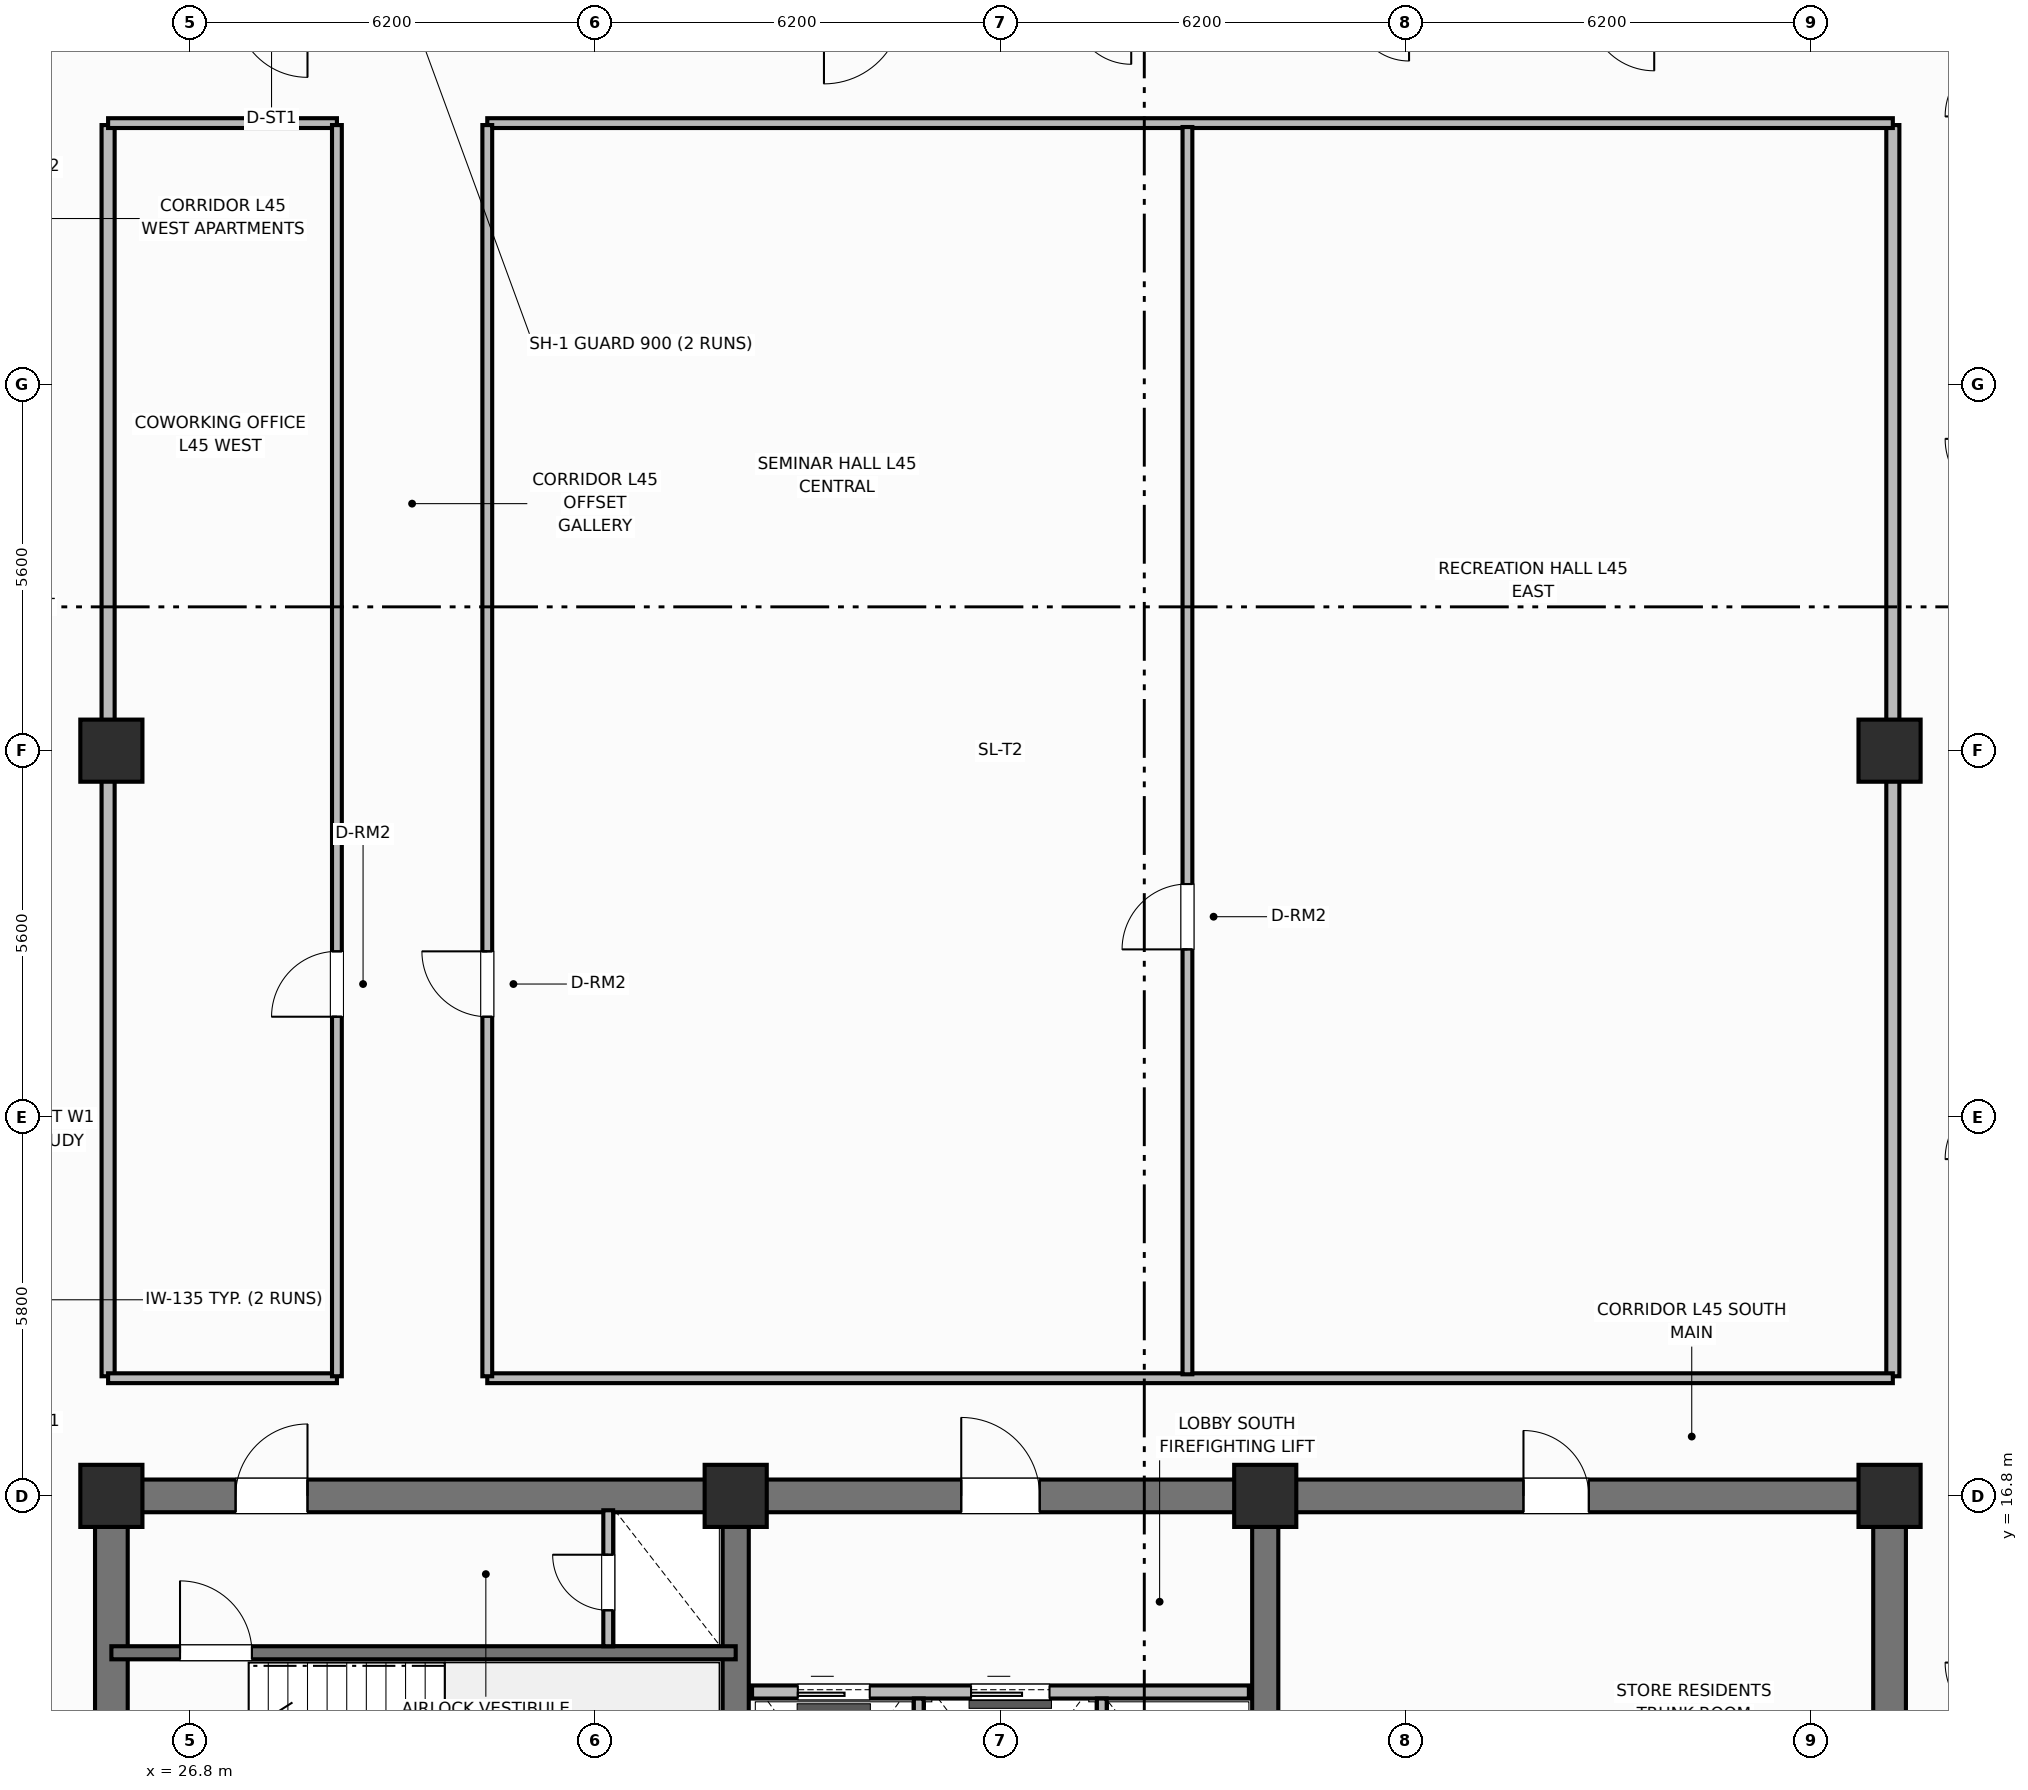
"""IFC4 building model, lengths in metres.
Left out: names, types, materials, properties, quantities, classifications, styles, units other than length and angle.
Written with IfcOpenShell. Run it as: python <this file> out.ifc"""

import sys

from ifc_helpers import new_model, si_unit, direction, frame, frame_2d, origin, origin_2d, place, context, subcontext, project, spatial, rectangle, extrude, element, fill, save


model = new_model("IFC4")
c1 = context("Model", 3, precision=1e-05, world=origin(), true_north=direction((0.0, 1.0)))
c2 = subcontext(c1, "Body", "Model", "MODEL_VIEW")
j1 = project(units=[si_unit("LENGTHUNIT", "METRE"), si_unit("PLANEANGLEUNIT", "RADIAN")], contexts=[c1])
p1 = place(None, origin())
s1 = spatial("IfcSite", under=j1, at=p1, CompositionType="ELEMENT")
p2 = place(p1, origin())
s2 = spatial("IfcBuilding", under=s1, at=p2, CompositionType="ELEMENT")
p3 = place(p2, frame((0.0, 0.0, 181.1)))
s3 = spatial("IfcBuildingStorey", under=s2, at=p3, CompositionType="ELEMENT", Elevation=181.1)
for number, where, z_axis, x_axis in (
    (1, (25.6, 10.85, 0.0), (0.0, 0.0, 1.0), (0.0, 1.0, 0.0)),
    (2, (52.8, 10.85, 0.0), (0.0, 0.0, 1.0), (0.0, 1.0, 0.0)),
):
    element("IfcWall", number, at=place(p3, frame(where, z_axis=z_axis, x_axis=x_axis)), inside=s3, PredefinedType="SHEAR", context=c2, shape_type="SweptSolid", body=[
        extrude(rectangle(XDim=5.7, YDim=0.5, at=frame_2d((2.85, 0.0))), origin(), (0.0, 0.0, 1.0), 3.7),
    ])
p4 = place(p3, frame((25.6, 16.8, 0.0), z_axis=(0.0, 0.0, 1.0), x_axis=(1.0, 0.0, 0.0)))
e3 = element("IfcWall", 3, at=p4, inside=s3, PredefinedType="SHEAR", context=c2, shape_type="SweptSolid", body=[
    extrude(rectangle(XDim=27.2, YDim=0.5, at=frame_2d((13.6, 0.0))), origin(), (0.0, 0.0, 1.0), 3.7),
])
p5 = place(p4, frame((1.9, 0.0, 0.0)))
e4 = element("IfcOpeningElement", 4, at=p5, cuts=e3, PredefinedType="OPENING", context=c2, shape_type="SweptSolid", body=[
    extrude(rectangle(XDim=1.1, YDim=2.15, at=frame_2d((0.55, 1.075))), frame((0.0, 0.26, 0.0), z_axis=(0.0, -1.0, 0.0), x_axis=(1.0, 0.0, 0.0)), (0.0, 0.0, 1.0), 0.52),
])
p6 = place(p4, frame((13.0, 0.0, 0.0)))
e5 = element("IfcOpeningElement", 5, at=p6, cuts=e3, PredefinedType="OPENING", context=c2, shape_type="SweptSolid", body=[
    extrude(rectangle(XDim=1.2, YDim=2.15, at=frame_2d((0.6, 1.075))), frame((0.0, 0.26, 0.0), z_axis=(0.0, -1.0, 0.0), x_axis=(1.0, 0.0, 0.0)), (0.0, 0.0, 1.0), 0.52),
])
p7 = place(p4, frame((21.6, 0.0, 0.0)))
e6 = element("IfcOpeningElement", 6, at=p7, cuts=e3, PredefinedType="OPENING", context=c2, shape_type="SweptSolid", body=[
    extrude(rectangle(XDim=1.0, YDim=2.15, at=frame_2d((0.5, 1.075))), frame((0.0, 0.26, 0.0), z_axis=(0.0, -1.0, 0.0), x_axis=(1.0, 0.0, 0.0)), (0.0, 0.0, 1.0), 0.52),
])
for number, where, z_axis, x_axis in (
    (7, (35.15, 10.85, 0.0), (0.0, 0.0, 1.0), (0.0, 1.0, 0.0)),
    (8, (43.25, 10.85, 0.0), (0.0, 0.0, 1.0), (0.0, 1.0, 0.0)),
):
    element("IfcWall", number, at=place(p3, frame(where, z_axis=z_axis, x_axis=x_axis)), inside=s3, PredefinedType="SHEAR", context=c2, shape_type="SweptSolid", body=[
        extrude(rectangle(XDim=5.7, YDim=0.4, at=frame_2d((2.85, 0.0))), origin(), (0.0, 0.0, 1.0), 3.7),
    ])
for number, where, z_axis, x_axis in (
    (9, (25.6, 16.8, 0.0), (0.0, 0.0, 1.0), (1.0, 0.0, 0.0)),
    (10, (35.15, 16.8, 0.0), (0.0, 0.0, 1.0), (1.0, 0.0, 0.0)),
    (11, (43.25, 16.8, 0.0), (0.0, 0.0, 1.0), (1.0, 0.0, 0.0)),
    (12, (52.8, 16.8, 0.0), (0.0, 0.0, 1.0), (1.0, 0.0, 0.0)),
    (13, (25.6, 28.2, 0.0), (0.0, 0.0, 1.0), (1.0, 0.0, 0.0)),
    (14, (52.8, 28.2, 0.0), (0.0, 0.0, 1.0), (1.0, 0.0, 0.0)),
):
    element("IfcColumn", number, at=place(p3, frame(where, z_axis=z_axis, x_axis=x_axis)), inside=s3, PredefinedType="COLUMN", context=c2, shape_type="SweptSolid", body=[
        extrude(rectangle(XDim=0.95, YDim=0.95, at=origin_2d()), origin(), (0.0, 0.0, 1.0), 3.7),
    ])
p8 = place(p3, frame((25.6, 14.4, 0.0), z_axis=(0.0, 0.0, 1.0), x_axis=(1.0, 0.0, 0.0)))
e15 = element("IfcWall", 15, at=p8, inside=s3, PredefinedType="SHEAR", context=c2, shape_type="SweptSolid", body=[
    extrude(rectangle(XDim=9.55, YDim=0.2, at=frame_2d((4.775, 0.0))), origin(), (0.0, 0.0, 1.0), 3.7),
])
p9 = place(p8, frame((1.05, 0.0, 0.0)))
e16 = element("IfcOpeningElement", 16, at=p9, cuts=e15, PredefinedType="OPENING", context=c2, shape_type="SweptSolid", body=[
    extrude(rectangle(XDim=1.1, YDim=2.15, at=frame_2d((0.55, 1.075))), frame((0.0, 0.11, 0.0), z_axis=(0.0, -1.0, 0.0), x_axis=(1.0, 0.0, 0.0)), (0.0, 0.0, 1.0), 0.22),
])
p10 = place(p3, frame((33.2, 14.5, 0.0), z_axis=(0.0, 0.0, 1.0), x_axis=(0.0, 1.0, 0.0)))
e17 = element("IfcWall", 17, at=p10, inside=s3, PredefinedType="PARTITIONING", context=c2, shape_type="SweptSolid", body=[
    extrude(rectangle(XDim=2.08, YDim=0.15, at=frame_2d((1.04, 0.0))), origin(), (0.0, 0.0, 1.0), 2.55),
])
p11 = place(p10, frame((0.55, 0.0, 0.0)))
e18 = element("IfcOpeningElement", 18, at=p11, cuts=e17, PredefinedType="OPENING", context=c2, shape_type="SweptSolid", body=[
    extrude(rectangle(XDim=0.85, YDim=2.05, at=frame_2d((0.425, 1.025))), frame((0.0, 0.085, 0.0), z_axis=(0.0, -1.0, 0.0), x_axis=(1.0, 0.0, 0.0)), (0.0, 0.0, 1.0), 0.17),
])
p12 = place(p3, frame((35.4, 13.8, 0.0), z_axis=(0.0, 0.0, 1.0), x_axis=(1.0, 0.0, 0.0)))
e19 = element("IfcWall", 19, at=p12, inside=s3, PredefinedType="PARTITIONING", context=c2, shape_type="SweptSolid", body=[
    extrude(rectangle(XDim=7.6, YDim=0.2, at=frame_2d((3.8, 0.0))), origin(), (0.0, 0.0, 1.0), 2.32),
])
p13 = place(p12, frame((0.7, 0.0, 0.0)))
e20 = element("IfcOpeningElement", 20, at=p13, cuts=e19, PredefinedType="OPENING", context=c2, shape_type="SweptSolid", body=[
    extrude(rectangle(XDim=1.1, YDim=2.15, at=frame_2d((0.55, 1.075))), frame((0.0, 0.11, 0.0), z_axis=(0.0, -1.0, 0.0), x_axis=(1.0, 0.0, 0.0)), (0.0, 0.0, 1.0), 0.22),
])
p14 = place(p12, frame((3.35, 0.0, 0.0)))
e21 = element("IfcOpeningElement", 21, at=p14, cuts=e19, PredefinedType="OPENING", context=c2, shape_type="SweptSolid", body=[
    extrude(rectangle(XDim=1.2, YDim=2.15, at=frame_2d((0.6, 1.075))), frame((0.0, 0.11, 0.0), z_axis=(0.0, -1.0, 0.0), x_axis=(1.0, 0.0, 0.0)), (0.0, 0.0, 1.0), 0.22),
])
for number, where, z_axis, x_axis in (
    (22, (37.95, 10.95, 0.0), (0.0, 0.0, 1.0), (0.0, 1.0, 0.0)),
    (23, (40.75, 10.95, 0.0), (0.0, 0.0, 1.0), (0.0, 1.0, 0.0)),
):
    element("IfcWall", number, at=place(p3, frame(where, z_axis=z_axis, x_axis=x_axis)), inside=s3, PredefinedType="PARTITIONING", context=c2, shape_type="SweptSolid", body=[
        extrude(rectangle(XDim=2.75, YDim=0.15, at=frame_2d((1.375, 0.0))), origin(), (0.0, 0.0, 1.0), 2.55),
    ])
for number, where, z_axis, x_axis in (
    (24, (25.55, 18.63, 0.0), (0.0, 0.0, 1.0), (0.0, 1.0, 0.0)),
    (25, (52.85, 18.63, 0.0), (0.0, 0.0, 1.0), (0.0, 1.0, 0.0)),
):
    element("IfcWall", number, at=place(p3, frame(where, z_axis=z_axis, x_axis=x_axis)), inside=s3, PredefinedType="PARTITIONING", context=c2, shape_type="SweptSolid", body=[
        extrude(rectangle(XDim=19.14, YDim=0.2, at=frame_2d((9.57, 0.0))), origin(), (0.0, 0.0, 1.0), 2.55),
    ])
p15 = place(p3, frame((25.55, 18.6, 0.0), z_axis=(0.0, 0.0, 1.0), x_axis=(1.0, 0.0, 0.0)))
e26 = element("IfcWall", 26, at=p15, inside=s3, PredefinedType="PARTITIONING", context=c2, shape_type="SweptSolid", body=[
    extrude(rectangle(XDim=3.5, YDim=0.15, at=frame_2d((1.75, 0.0))), origin(), (0.0, 0.0, 1.0), 2.55),
])
p16 = place(p3, frame((31.35, 18.6, 0.0), z_axis=(0.0, 0.0, 1.0), x_axis=(1.0, 0.0, 0.0)))
e27 = element("IfcWall", 27, at=p16, inside=s3, PredefinedType="PARTITIONING", context=c2, shape_type="SweptSolid", body=[
    extrude(rectangle(XDim=21.5, YDim=0.15, at=frame_2d((10.75, 0.0))), origin(), (0.0, 0.0, 1.0), 2.55),
])
p17 = place(p3, frame((25.55, 37.8, 0.0), z_axis=(0.0, 0.0, 1.0), x_axis=(1.0, 0.0, 0.0)))
e28 = element("IfcWall", 28, at=p17, inside=s3, PredefinedType="PARTITIONING", context=c2, shape_type="SweptSolid", body=[
    extrude(rectangle(XDim=3.5, YDim=0.15, at=frame_2d((1.75, 0.0))), origin(), (0.0, 0.0, 1.0), 2.55),
])
p18 = place(p3, frame((31.35, 37.8, 0.0), z_axis=(0.0, 0.0, 1.0), x_axis=(1.0, 0.0, 0.0)))
e29 = element("IfcWall", 29, at=p18, inside=s3, PredefinedType="PARTITIONING", context=c2, shape_type="SweptSolid", body=[
    extrude(rectangle(XDim=21.5, YDim=0.15, at=frame_2d((10.75, 0.0))), origin(), (0.0, 0.0, 1.0), 2.55),
])
p19 = place(p3, frame((42.06, 18.66, 0.0), z_axis=(0.0, 0.0, 1.0), x_axis=(0.0, 1.0, 0.0)))
e30 = element("IfcWall", 30, at=p19, inside=s3, PredefinedType="PARTITIONING", context=c2, shape_type="SweptSolid", body=[
    extrude(rectangle(XDim=19.08, YDim=0.15, at=frame_2d((9.54, 0.0))), origin(), (0.0, 0.0, 1.0), 2.55),
])
p20 = place(p19, frame((6.5, 0.0, 0.0)))
e31 = element("IfcOpeningElement", 31, at=p20, cuts=e30, PredefinedType="OPENING", context=c2, shape_type="SweptSolid", body=[
    extrude(rectangle(XDim=1.0, YDim=2.15, at=frame_2d((0.5, 1.075))), frame((0.0, 0.085, 0.0), z_axis=(0.0, -1.0, 0.0), x_axis=(1.0, 0.0, 0.0)), (0.0, 0.0, 1.0), 0.17),
])
p21 = place(p3, frame((29.05, 18.63, 0.0), z_axis=(0.0, 0.0, 1.0), x_axis=(0.0, 1.0, 0.0)))
e32 = element("IfcWall", 32, at=p21, inside=s3, PredefinedType="PARTITIONING", context=c2, shape_type="SweptSolid", body=[
    extrude(rectangle(XDim=19.14, YDim=0.15, at=frame_2d((9.57, 0.0))), origin(), (0.0, 0.0, 1.0), 2.55),
])
p22 = place(p21, frame((5.5, 0.0, 0.0)))
e33 = element("IfcOpeningElement", 33, at=p22, cuts=e32, PredefinedType="OPENING", context=c2, shape_type="SweptSolid", body=[
    extrude(rectangle(XDim=1.0, YDim=2.15, at=frame_2d((0.5, 1.075))), frame((0.0, 0.085, 0.0), z_axis=(0.0, -1.0, 0.0), x_axis=(1.0, 0.0, 0.0)), (0.0, 0.0, 1.0), 0.17),
])
p23 = place(p3, frame((31.35, 18.63, 0.0), z_axis=(0.0, 0.0, 1.0), x_axis=(0.0, 1.0, 0.0)))
e34 = element("IfcWall", 34, at=p23, inside=s3, PredefinedType="PARTITIONING", context=c2, shape_type="SweptSolid", body=[
    extrude(rectangle(XDim=19.14, YDim=0.15, at=frame_2d((9.57, 0.0))), origin(), (0.0, 0.0, 1.0), 2.55),
])
p24 = place(p23, frame((5.5, 0.0, 0.0)))
e35 = element("IfcOpeningElement", 35, at=p24, cuts=e34, PredefinedType="OPENING", context=c2, shape_type="SweptSolid", body=[
    extrude(rectangle(XDim=1.0, YDim=2.15, at=frame_2d((0.5, 1.075))), frame((0.0, 0.085, 0.0), z_axis=(0.0, -1.0, 0.0), x_axis=(1.0, 0.0, 0.0)), (0.0, 0.0, 1.0), 0.17),
])
p25 = place(p9, origin())
e36 = element("IfcDoor", 36, at=p25, inside=s3, OperationType="SINGLE_SWING_LEFT", PredefinedType="DOOR", context=c2, shape_type="SweptSolid", body=[
    extrude(rectangle(XDim=1.1, YDim=2.15, at=frame_2d((0.55, 1.075))), frame((0.0, 0.025, 0.0), z_axis=(0.0, -1.0, 0.0), x_axis=(1.0, 0.0, 0.0)), (0.0, 0.0, 1.0), 0.05),
])
fill(e16, e36)
p26 = place(p11, origin())
e37 = element("IfcDoor", 37, at=p26, inside=s3, OperationType="SINGLE_SWING_RIGHT", PredefinedType="TRAPDOOR", context=c2, shape_type="SweptSolid", body=[
    extrude(rectangle(XDim=0.85, YDim=2.05, at=frame_2d((0.425, 1.025))), frame((0.0, 0.025, 0.0), z_axis=(0.0, -1.0, 0.0), x_axis=(1.0, 0.0, 0.0)), (0.0, 0.0, 1.0), 0.05),
])
fill(e18, e37)
p27 = place(p13, origin())
e38 = element("IfcDoor", 38, at=p27, inside=s3, OperationType="SLIDING_TO_LEFT", PredefinedType="DOOR", context=c2, shape_type="SweptSolid", body=[
    extrude(rectangle(XDim=1.1, YDim=2.15, at=frame_2d((0.55, 1.075))), frame((0.0, 0.025, 0.0), z_axis=(0.0, -1.0, 0.0), x_axis=(1.0, 0.0, 0.0)), (0.0, 0.0, 1.0), 0.05),
])
fill(e20, e38)
p28 = place(p14, origin())
e39 = element("IfcDoor", 39, at=p28, inside=s3, OperationType="SLIDING_TO_LEFT", PredefinedType="DOOR", context=c2, shape_type="SweptSolid", body=[
    extrude(rectangle(XDim=1.2, YDim=2.15, at=frame_2d((0.6, 1.075))), frame((0.0, 0.025, 0.0), z_axis=(0.0, -1.0, 0.0), x_axis=(1.0, 0.0, 0.0)), (0.0, 0.0, 1.0), 0.05),
])
fill(e21, e39)
p29 = place(p20, origin())
e40 = element("IfcDoor", 40, at=p29, inside=s3, OperationType="SINGLE_SWING_LEFT", PredefinedType="DOOR", context=c2, shape_type="SweptSolid", body=[
    extrude(rectangle(XDim=1.0, YDim=2.15, at=frame_2d((0.5, 1.075))), frame((0.0, 0.025, 0.0), z_axis=(0.0, -1.0, 0.0), x_axis=(1.0, 0.0, 0.0)), (0.0, 0.0, 1.0), 0.05),
])
fill(e31, e40)
p30 = place(p22, origin())
e41 = element("IfcDoor", 41, at=p30, inside=s3, OperationType="SINGLE_SWING_LEFT", PredefinedType="DOOR", context=c2, shape_type="SweptSolid", body=[
    extrude(rectangle(XDim=1.0, YDim=2.15, at=frame_2d((0.5, 1.075))), frame((0.0, 0.025, 0.0), z_axis=(0.0, -1.0, 0.0), x_axis=(1.0, 0.0, 0.0)), (0.0, 0.0, 1.0), 0.05),
])
fill(e33, e41)
p31 = place(p24, origin())
e42 = element("IfcDoor", 42, at=p31, inside=s3, OperationType="SINGLE_SWING_RIGHT", PredefinedType="DOOR", context=c2, shape_type="SweptSolid", body=[
    extrude(rectangle(XDim=1.0, YDim=2.15, at=frame_2d((0.5, 1.075))), frame((0.0, 0.025, 0.0), z_axis=(0.0, -1.0, 0.0), x_axis=(1.0, 0.0, 0.0)), (0.0, 0.0, 1.0), 0.05),
])
fill(e35, e42)
p32 = place(p5, origin())
e43 = element("IfcDoor", 43, at=p32, inside=s3, OperationType="SINGLE_SWING_RIGHT", PredefinedType="DOOR", context=c2, shape_type="SweptSolid", body=[
    extrude(rectangle(XDim=1.1, YDim=2.15, at=frame_2d((0.55, 1.075))), frame((0.0, 0.025, 0.0), z_axis=(0.0, -1.0, 0.0), x_axis=(1.0, 0.0, 0.0)), (0.0, 0.0, 1.0), 0.05),
])
fill(e4, e43)
p33 = place(p6, origin())
e44 = element("IfcDoor", 44, at=p33, inside=s3, OperationType="SINGLE_SWING_LEFT", PredefinedType="DOOR", context=c2, shape_type="SweptSolid", body=[
    extrude(rectangle(XDim=1.2, YDim=2.15, at=frame_2d((0.6, 1.075))), frame((0.0, 0.025, 0.0), z_axis=(0.0, -1.0, 0.0), x_axis=(1.0, 0.0, 0.0)), (0.0, 0.0, 1.0), 0.05),
])
fill(e5, e44)
p34 = place(p7, origin())
e45 = element("IfcDoor", 45, at=p34, inside=s3, OperationType="SINGLE_SWING_LEFT", PredefinedType="DOOR", context=c2, shape_type="SweptSolid", body=[
    extrude(rectangle(XDim=1.0, YDim=2.15, at=frame_2d((0.5, 1.075))), frame((0.0, 0.025, 0.0), z_axis=(0.0, -1.0, 0.0), x_axis=(1.0, 0.0, 0.0)), (0.0, 0.0, 1.0), 0.05),
])
fill(e6, e45)
save(model, sys.argv[1])
